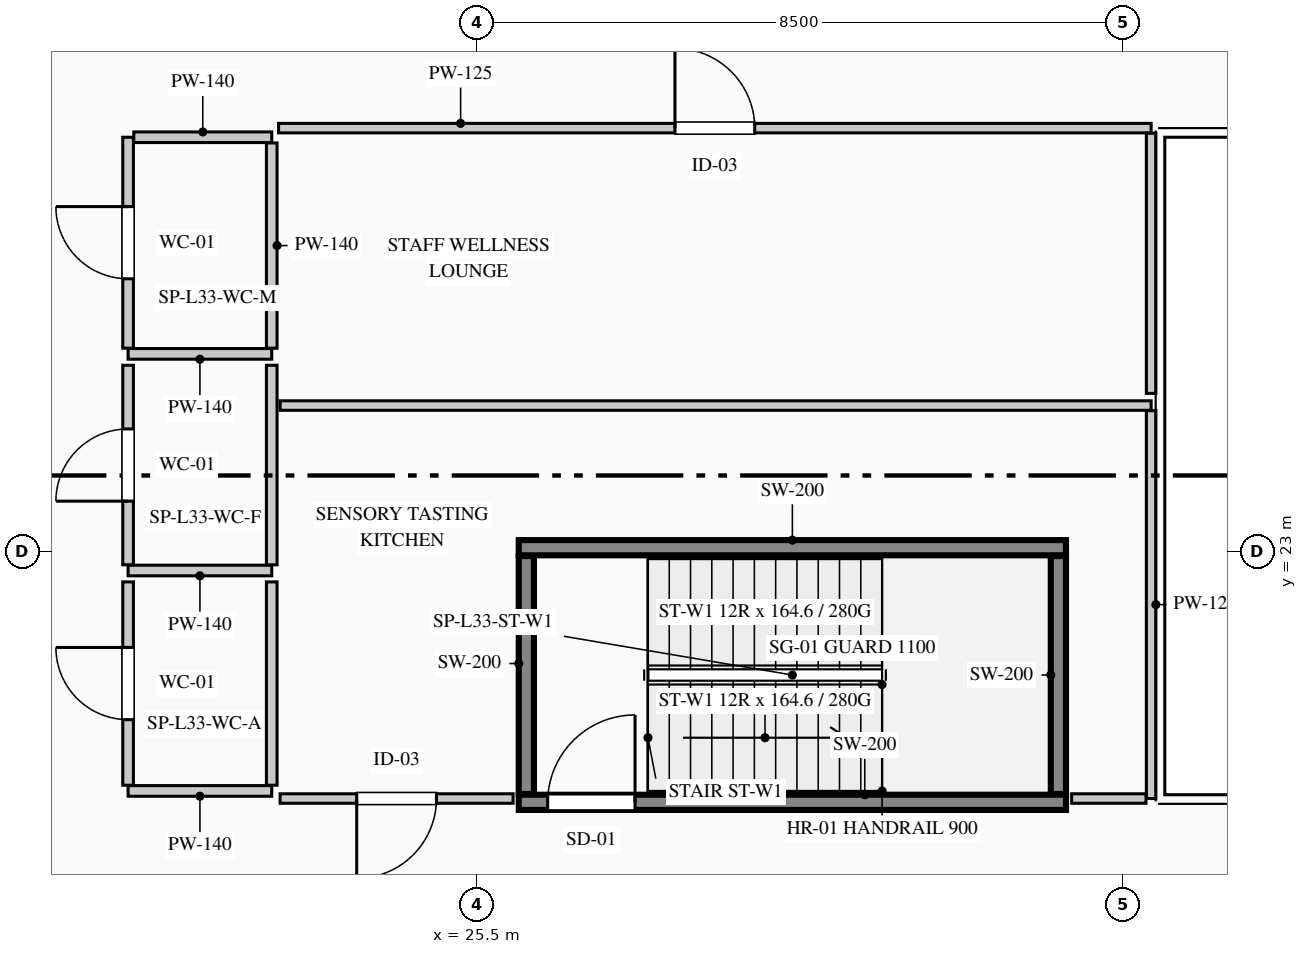
"""IFC4 building model, lengths in metres.
Left out: names, types, materials, properties, quantities, classifications, styles, units other than length and angle.
Written with IfcOpenShell. Run it as: python <this file> out.ifc"""

import sys

from ifc_helpers import new_model, si_unit, direction, frame, frame_2d, origin, place, context, subcontext, project, spatial, rectangle, extrude, element, fill, save


model = new_model("IFC4")
c1 = context("Model", 3, precision=1e-05, world=origin(), true_north=direction((0.0, 1.0)))
c2 = subcontext(c1, "Body", "Model", "MODEL_VIEW")
j1 = project(units=[si_unit("LENGTHUNIT", "METRE"), si_unit("PLANEANGLEUNIT", "RADIAN")], contexts=[c1])
p1 = place(None, origin())
s1 = spatial("IfcSite", under=j1, at=p1, CompositionType="ELEMENT")
p2 = place(p1, origin())
s2 = spatial("IfcBuilding", under=s1, at=p2, CompositionType="ELEMENT")
p3 = place(p2, frame((0.0, 0.0, 143.0)))
s3 = spatial("IfcBuildingStorey", under=s2, at=p3, CompositionType="ELEMENT", Elevation=143.0)
p4 = place(p3, frame((26.05, 19.7, 0.0), z_axis=(0.0, 0.0, 1.0), x_axis=(1.0, 0.0, 0.0)))
e1 = element("IfcWall", 1, at=p4, inside=s3, PredefinedType="SHEAR", context=c2, shape_type="SweptSolid", body=[
    extrude(rectangle(XDim=7.2, YDim=0.2, at=frame_2d((3.6, 0.0))), origin(), (0.0, 0.0, 1.0), 3.95),
])
p5 = place(p4, frame((0.38, 0.0, 0.0)))
e2 = element("IfcOpeningElement", 2, at=p5, cuts=e1, PredefinedType="OPENING", context=c2, shape_type="SweptSolid", body=[
    extrude(rectangle(XDim=1.15, YDim=2.2, at=frame_2d((0.575, 1.1))), frame((0.0, 0.11, 0.0), z_axis=(0.0, -1.0, 0.0), x_axis=(1.0, 0.0, 0.0)), (0.0, 0.0, 1.0), 0.22),
])
p6 = place(p3, frame((26.05, 23.05, 0.0), z_axis=(0.0, 0.0, 1.0), x_axis=(1.0, 0.0, 0.0)))
e3 = element("IfcWall", 3, at=p6, inside=s3, PredefinedType="SHEAR", context=c2, shape_type="SweptSolid", body=[
    extrude(rectangle(XDim=7.2, YDim=0.2, at=frame_2d((3.6, 0.0))), origin(), (0.0, 0.0, 1.0), 3.95),
])
for number, where, z_axis, x_axis in (
    (4, (26.15, 19.81, 0.0), (0.0, 0.0, 1.0), (0.0, 1.0, 0.0)),
    (5, (33.15, 19.81, 0.0), (0.0, 0.0, 1.0), (0.0, 1.0, 0.0)),
):
    element("IfcWall", number, at=place(p3, frame(where, z_axis=z_axis, x_axis=x_axis)), inside=s3, PredefinedType="SHEAR", context=c2, shape_type="SweptSolid", body=[
        extrude(rectangle(XDim=3.13, YDim=0.2, at=frame_2d((1.565, 0.0))), origin(), (0.0, 0.0, 1.0), 3.95),
    ])
p7 = place(p3, frame((22.8, 25.6, 0.0), z_axis=(0.0, 0.0, 1.0), x_axis=(-1.0, 0.0, 0.0)))
e6 = element("IfcWall", 6, at=p7, inside=s3, PredefinedType="PARTITIONING", context=c2, shape_type="SweptSolid", body=[
    extrude(rectangle(XDim=1.89, YDim=0.14, at=frame_2d((0.945, 0.0))), origin(), (0.0, 0.0, 1.0), 3.69),
])
p8 = place(p3, frame((20.91, 25.675, 0.0), z_axis=(0.0, 0.0, 1.0), x_axis=(0.0, 1.0, 0.0)))
e7 = element("IfcWall", 7, at=p8, inside=s3, PredefinedType="PARTITIONING", context=c2, shape_type="SweptSolid", body=[
    extrude(rectangle(XDim=2.775, YDim=0.14, at=frame_2d((1.387, 0.0))), origin(), (0.0, 0.0, 1.0), 3.69),
])
p9 = place(p8, frame((0.913, 0.0, 0.0)))
e8 = element("IfcOpeningElement", 8, at=p9, cuts=e7, PredefinedType="OPENING", context=c2, shape_type="SweptSolid", body=[
    extrude(rectangle(XDim=0.95, YDim=2.15, at=frame_2d((0.475, 1.075))), frame((0.0, 0.08, 0.0), z_axis=(0.0, -1.0, 0.0), x_axis=(1.0, 0.0, 0.0)), (0.0, 0.0, 1.0), 0.16),
])
p10 = place(p3, frame((20.985, 28.45, 0.0), z_axis=(0.0, 0.0, 1.0), x_axis=(1.0, 0.0, 0.0)))
e9 = element("IfcWall", 9, at=p10, inside=s3, PredefinedType="PARTITIONING", context=c2, shape_type="SweptSolid", body=[
    extrude(rectangle(XDim=1.815, YDim=0.14, at=frame_2d((0.907, 0.0))), origin(), (0.0, 0.0, 1.0), 3.69),
])
p11 = place(p3, frame((22.8, 28.375, 0.0), z_axis=(0.0, 0.0, 1.0), x_axis=(0.0, -1.0, 0.0)))
e10 = element("IfcWall", 10, at=p11, inside=s3, PredefinedType="PARTITIONING", context=c2, shape_type="SweptSolid", body=[
    extrude(rectangle(XDim=2.7, YDim=0.14, at=frame_2d((1.35, 0.0))), origin(), (0.0, 0.0, 1.0), 3.275),
])
p12 = place(p3, frame((22.8, 22.75, 0.0), z_axis=(0.0, 0.0, 1.0), x_axis=(-1.0, 0.0, 0.0)))
e11 = element("IfcWall", 11, at=p12, inside=s3, PredefinedType="PARTITIONING", context=c2, shape_type="SweptSolid", body=[
    extrude(rectangle(XDim=1.89, YDim=0.14, at=frame_2d((0.945, 0.0))), origin(), (0.0, 0.0, 1.0), 3.69),
])
p13 = place(p3, frame((20.91, 22.825, 0.0), z_axis=(0.0, 0.0, 1.0), x_axis=(0.0, 1.0, 0.0)))
e12 = element("IfcWall", 12, at=p13, inside=s3, PredefinedType="PARTITIONING", context=c2, shape_type="SweptSolid", body=[
    extrude(rectangle(XDim=2.625, YDim=0.14, at=frame_2d((1.312, 0.0))), origin(), (0.0, 0.0, 1.0), 3.69),
])
p14 = place(p13, frame((0.837, 0.0, 0.0)))
e13 = element("IfcOpeningElement", 13, at=p14, cuts=e12, PredefinedType="OPENING", context=c2, shape_type="SweptSolid", body=[
    extrude(rectangle(XDim=0.95, YDim=2.15, at=frame_2d((0.475, 1.075))), frame((0.0, 0.08, 0.0), z_axis=(0.0, -1.0, 0.0), x_axis=(1.0, 0.0, 0.0)), (0.0, 0.0, 1.0), 0.16),
])
p15 = place(p3, frame((22.8, 25.45, 0.0), z_axis=(0.0, 0.0, 1.0), x_axis=(0.0, -1.0, 0.0)))
e14 = element("IfcWall", 14, at=p15, inside=s3, PredefinedType="PARTITIONING", context=c2, shape_type="SweptSolid", body=[
    extrude(rectangle(XDim=2.625, YDim=0.14, at=frame_2d((1.312, 0.0))), origin(), (0.0, 0.0, 1.0), 3.275),
])
p16 = place(p3, frame((22.8, 19.85, 0.0), z_axis=(0.0, 0.0, 1.0), x_axis=(-1.0, 0.0, 0.0)))
e15 = element("IfcWall", 15, at=p16, inside=s3, PredefinedType="PARTITIONING", context=c2, shape_type="SweptSolid", body=[
    extrude(rectangle(XDim=1.89, YDim=0.14, at=frame_2d((0.945, 0.0))), origin(), (0.0, 0.0, 1.0), 3.69),
])
p17 = place(p3, frame((20.91, 19.925, 0.0), z_axis=(0.0, 0.0, 1.0), x_axis=(0.0, 1.0, 0.0)))
e16 = element("IfcWall", 16, at=p17, inside=s3, PredefinedType="PARTITIONING", context=c2, shape_type="SweptSolid", body=[
    extrude(rectangle(XDim=2.675, YDim=0.14, at=frame_2d((1.337, 0.0))), origin(), (0.0, 0.0, 1.0), 3.69),
])
p18 = place(p17, frame((0.863, 0.0, 0.0)))
e17 = element("IfcOpeningElement", 17, at=p18, cuts=e16, PredefinedType="OPENING", context=c2, shape_type="SweptSolid", body=[
    extrude(rectangle(XDim=0.95, YDim=2.15, at=frame_2d((0.475, 1.075))), frame((0.0, 0.08, 0.0), z_axis=(0.0, -1.0, 0.0), x_axis=(1.0, 0.0, 0.0)), (0.0, 0.0, 1.0), 0.16),
])
p19 = place(p3, frame((22.8, 22.6, 0.0), z_axis=(0.0, 0.0, 1.0), x_axis=(0.0, -1.0, 0.0)))
e18 = element("IfcWall", 18, at=p19, inside=s3, PredefinedType="PARTITIONING", context=c2, shape_type="SweptSolid", body=[
    extrude(rectangle(XDim=2.675, YDim=0.14, at=frame_2d((1.337, 0.0))), origin(), (0.0, 0.0, 1.0), 3.275),
])
p20 = place(p3, frame((25.976, 19.75, 0.0), z_axis=(0.0, 0.0, 1.0), x_axis=(-1.0, 0.0, 0.0)))
e19 = element("IfcWall", 19, at=p20, inside=s3, PredefinedType="PARTITIONING", context=c2, shape_type="SweptSolid", body=[
    extrude(rectangle(XDim=3.066, YDim=0.125, at=frame_2d((1.533, 0.0))), origin(), (0.0, 0.0, 1.0), 3.69),
])
p21 = place(p20, frame((1.008, 0.0, 0.0)))
e20 = element("IfcOpeningElement", 20, at=p21, cuts=e19, PredefinedType="OPENING", context=c2, shape_type="SweptSolid", body=[
    extrude(rectangle(XDim=1.05, YDim=2.15, at=frame_2d((0.525, 1.075))), frame((0.0, 0.073, 0.0), z_axis=(0.0, -1.0, 0.0), x_axis=(1.0, 0.0, 0.0)), (0.0, 0.0, 1.0), 0.145),
])
p22 = place(p3, frame((22.91, 24.92, 0.0), z_axis=(0.0, 0.0, 1.0), x_axis=(1.0, 0.0, 0.0)))
e21 = element("IfcWall", 21, at=p22, inside=s3, PredefinedType="PARTITIONING", context=c2, shape_type="SweptSolid", body=[
    extrude(rectangle(XDim=11.46, YDim=0.125, at=frame_2d((5.73, 0.0))), origin(), (0.0, 0.0, 1.0), 3.275),
])
p23 = place(p3, frame((34.37, 24.853, 0.0), z_axis=(0.0, 0.0, 1.0), x_axis=(0.0, -1.0, 0.0)))
e22 = element("IfcWall", 22, at=p23, inside=s3, PredefinedType="PARTITIONING", context=c2, shape_type="SweptSolid", body=[
    extrude(rectangle(XDim=5.103, YDim=0.125, at=frame_2d((2.551, 0.0))), origin(), (0.0, 0.0, 1.0), 3.69),
])
p24 = place(p3, frame((34.302, 19.75, 0.0), z_axis=(0.0, 0.0, 1.0), x_axis=(-1.0, 0.0, 0.0)))
e23 = element("IfcWall", 23, at=p24, inside=s3, PredefinedType="PARTITIONING", context=c2, shape_type="SweptSolid", body=[
    extrude(rectangle(XDim=0.978, YDim=0.125, at=frame_2d((0.489, 0.0))), origin(), (0.0, 0.0, 1.0), 3.69),
])
p25 = place(p3, frame((22.89, 28.57, 0.0), z_axis=(0.0, 0.0, 1.0), x_axis=(1.0, 0.0, 0.0)))
e24 = element("IfcWall", 24, at=p25, inside=s3, PredefinedType="PARTITIONING", context=c2, shape_type="SweptSolid", body=[
    extrude(rectangle(XDim=11.48, YDim=0.125, at=frame_2d((5.74, 0.0))), origin(), (0.0, 0.0, 1.0), 3.275),
])
p26 = place(p25, frame((5.215, 0.0, 0.0)))
e25 = element("IfcOpeningElement", 25, at=p26, cuts=e24, PredefinedType="OPENING", context=c2, shape_type="SweptSolid", body=[
    extrude(rectangle(XDim=1.05, YDim=2.15, at=frame_2d((0.525, 1.075))), frame((0.0, 0.073, 0.0), z_axis=(0.0, -1.0, 0.0), x_axis=(1.0, 0.0, 0.0)), (0.0, 0.0, 1.0), 0.145),
])
p27 = place(p3, frame((34.37, 28.502, 0.0), z_axis=(0.0, 0.0, 1.0), x_axis=(0.0, -1.0, 0.0)))
e26 = element("IfcWall", 26, at=p27, inside=s3, PredefinedType="PARTITIONING", context=c2, shape_type="SweptSolid", body=[
    extrude(rectangle(XDim=3.422, YDim=0.125, at=frame_2d((1.711, 0.0))), origin(), (0.0, 0.0, 1.0), 3.69),
])
p28 = place(p5, origin())
e27 = element("IfcDoor", 27, at=p28, inside=s3, OperationType="SINGLE_SWING_RIGHT", PredefinedType="DOOR", context=c2, shape_type="SweptSolid", body=[
    extrude(rectangle(XDim=1.15, YDim=2.2, at=frame_2d((0.575, 1.1))), frame((0.0, 0.025, 0.0), z_axis=(0.0, -1.0, 0.0), x_axis=(1.0, 0.0, 0.0)), (0.0, 0.0, 1.0), 0.05),
])
fill(e2, e27)
p29 = place(p9, origin())
e28 = element("IfcDoor", 28, at=p29, inside=s3, OperationType="SINGLE_SWING_RIGHT", PredefinedType="DOOR", context=c2, shape_type="SweptSolid", body=[
    extrude(rectangle(XDim=0.95, YDim=2.15, at=frame_2d((0.475, 1.075))), frame((0.0, 0.025, 0.0), z_axis=(0.0, -1.0, 0.0), x_axis=(1.0, 0.0, 0.0)), (0.0, 0.0, 1.0), 0.05),
])
fill(e8, e28)
p30 = place(p14, origin())
e29 = element("IfcDoor", 29, at=p30, inside=s3, OperationType="SINGLE_SWING_LEFT", PredefinedType="DOOR", context=c2, shape_type="SweptSolid", body=[
    extrude(rectangle(XDim=0.95, YDim=2.15, at=frame_2d((0.475, 1.075))), frame((0.0, 0.025, 0.0), z_axis=(0.0, -1.0, 0.0), x_axis=(1.0, 0.0, 0.0)), (0.0, 0.0, 1.0), 0.05),
])
fill(e13, e29)
p31 = place(p18, origin())
e30 = element("IfcDoor", 30, at=p31, inside=s3, OperationType="SINGLE_SWING_RIGHT", PredefinedType="DOOR", context=c2, shape_type="SweptSolid", body=[
    extrude(rectangle(XDim=0.95, YDim=2.15, at=frame_2d((0.475, 1.075))), frame((0.0, 0.025, 0.0), z_axis=(0.0, -1.0, 0.0), x_axis=(1.0, 0.0, 0.0)), (0.0, 0.0, 1.0), 0.05),
])
fill(e17, e30)
p32 = place(p21, origin())
e31 = element("IfcDoor", 31, at=p32, inside=s3, OperationType="SINGLE_SWING_RIGHT", PredefinedType="DOOR", context=c2, shape_type="SweptSolid", body=[
    extrude(rectangle(XDim=1.05, YDim=2.15, at=frame_2d((0.525, 1.075))), frame((0.0, 0.025, 0.0), z_axis=(0.0, -1.0, 0.0), x_axis=(1.0, 0.0, 0.0)), (0.0, 0.0, 1.0), 0.05),
])
fill(e20, e31)
p33 = place(p26, origin())
e32 = element("IfcDoor", 32, at=p33, inside=s3, OperationType="SINGLE_SWING_LEFT", PredefinedType="DOOR", context=c2, shape_type="SweptSolid", body=[
    extrude(rectangle(XDim=1.05, YDim=2.15, at=frame_2d((0.525, 1.075))), frame((0.0, 0.025, 0.0), z_axis=(0.0, -1.0, 0.0), x_axis=(1.0, 0.0, 0.0)), (0.0, 0.0, 1.0), 0.05),
])
fill(e25, e32)
save(model, sys.argv[1])
